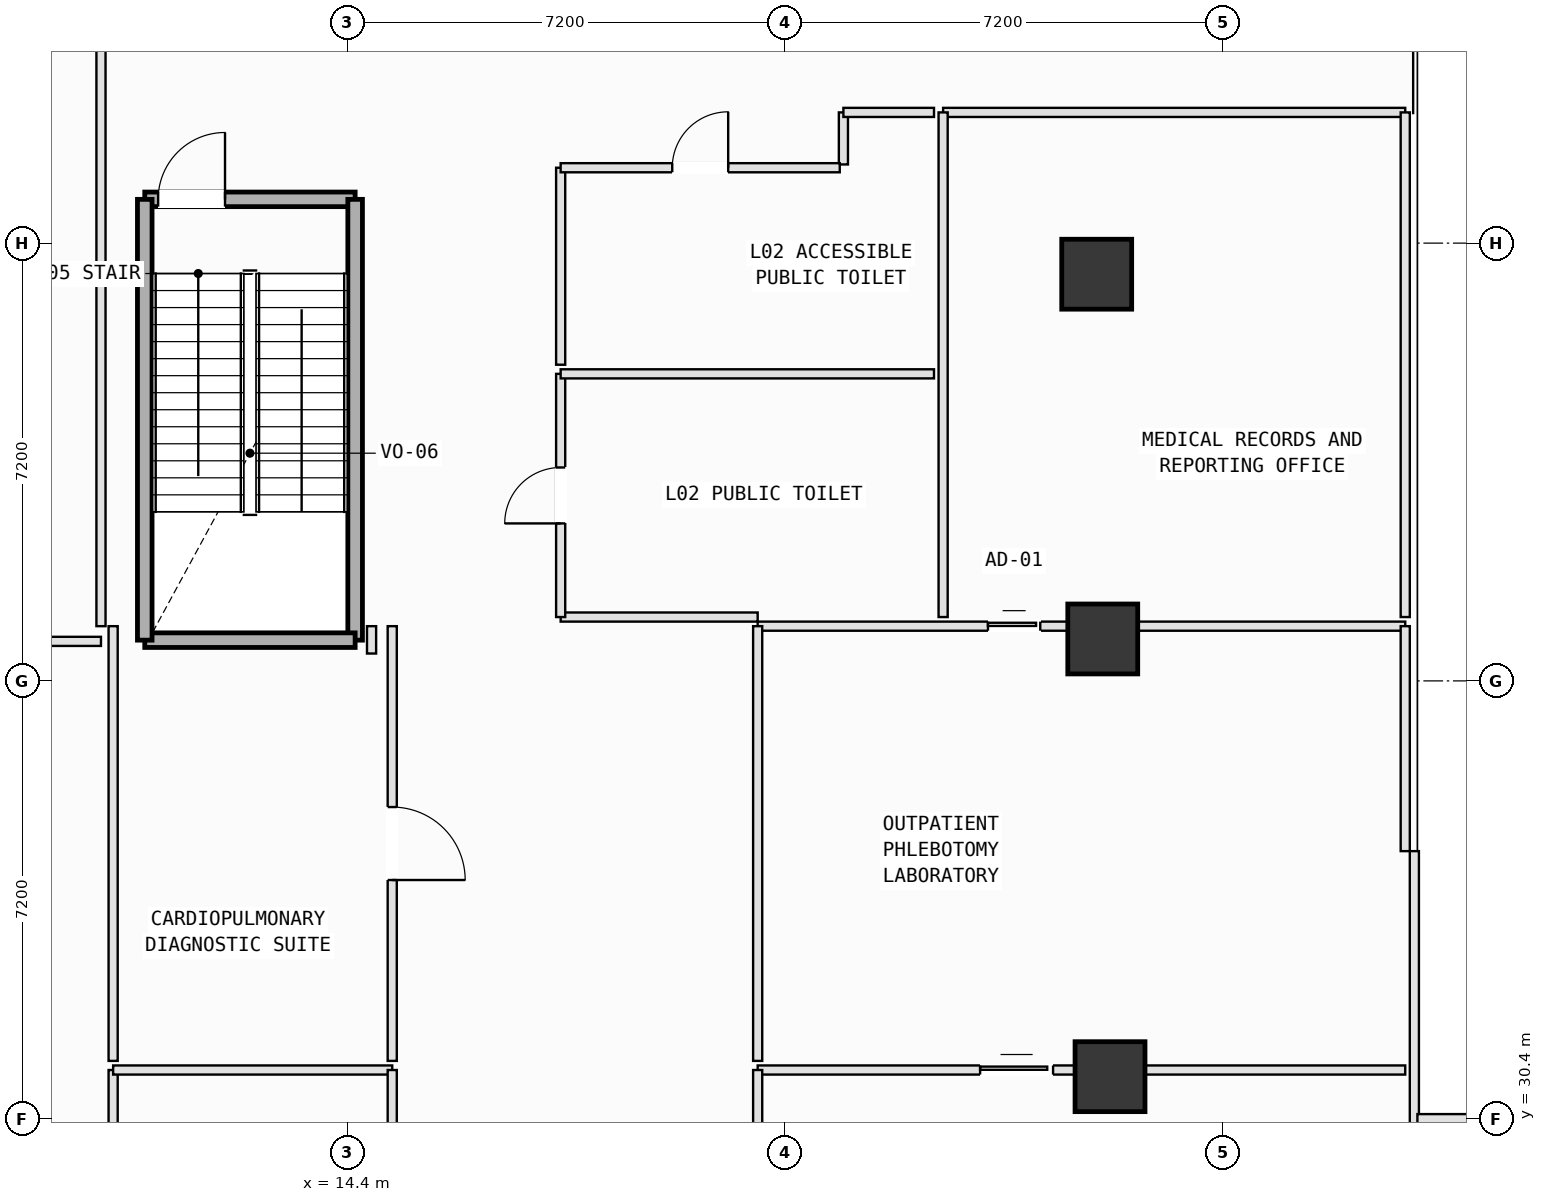
"""IFC4 building model, lengths in metres.
Left out: names, types, materials, properties, quantities, classifications, styles, units other than length and angle.
Written with IfcOpenShell. Run it as: python <this file> out.ifc"""

import sys

from ifc_helpers import new_model, si_unit, direction, frame, frame_2d, origin, origin_2d, place, context, subcontext, project, spatial, rectangle, extrude, element, fill, save


model = new_model("IFC4")
c1 = context("Model", 3, precision=1e-05, world=origin(), true_north=direction((0.0, 1.0)))
c2 = subcontext(c1, "Body", "Model", "MODEL_VIEW")
j1 = project(units=[si_unit("LENGTHUNIT", "METRE"), si_unit("PLANEANGLEUNIT", "RADIAN")], contexts=[c1])
p1 = place(None, origin())
s1 = spatial("IfcSite", under=j1, at=p1, CompositionType="ELEMENT")
p2 = place(p1, origin())
s2 = spatial("IfcBuilding", under=s1, at=p2, CompositionType="ELEMENT")
p3 = place(p2, frame((0.0, 0.0, 10.8)))
s3 = spatial("IfcBuildingStorey", under=s2, at=p3, CompositionType="ELEMENT", Elevation=10.8)
for number, where, z_axis, x_axis in (
    (1, (26.945, 31.091, 0.0), (0.0, 0.0, 1.0), (1.0, 0.0, 0.0)),
    (2, (26.825, 38.29, 0.0), (0.0, 0.0, 1.0), (1.0, 0.0, 0.0)),
    (3, (26.726, 44.289, 0.0), (0.0, 0.0, 1.0), (1.0, 0.0, 0.0)),
):
    element("IfcColumn", number, at=place(p3, frame(where, z_axis=z_axis, x_axis=x_axis)), inside=s3, PredefinedType="COLUMN", context=c2, shape_type="SweptSolid", body=[
        extrude(rectangle(XDim=1.15, YDim=1.15, at=origin_2d()), origin(), (0.0, 0.0, 1.0), 5.4),
    ])
p4 = place(p3, frame((11.07, 45.52, 0.0), z_axis=(0.0, 0.0, 1.0), x_axis=(1.0, 0.0, 0.0)))
e4 = element("IfcWall", 4, at=p4, inside=s3, PredefinedType="SOLIDWALL", context=c2, shape_type="SweptSolid", body=[
    extrude(rectangle(XDim=3.46, YDim=0.24, at=frame_2d((1.73, 0.0))), origin(), (0.0, 0.0, 1.0), 5.15),
])
p5 = place(p4, frame((0.22, 0.0, 0.0)))
e5 = element("IfcOpeningElement", 5, at=p5, cuts=e4, PredefinedType="OPENING", context=c2, shape_type="SweptSolid", body=[
    extrude(rectangle(XDim=1.1, YDim=2.15, at=frame_2d((0.55, 1.075))), frame((0.0, 0.13, 0.0), z_axis=(0.0, -1.0, 0.0), x_axis=(1.0, 0.0, 0.0)), (0.0, 0.0, 1.0), 0.26),
])
p6 = place(p3, frame((14.53, 45.52, 0.0), z_axis=(0.0, 0.0, 1.0), x_axis=(0.0, -1.0, 0.0)))
e6 = element("IfcWall", 6, at=p6, inside=s3, PredefinedType="SOLIDWALL", context=c2, shape_type="SweptSolid", body=[
    extrude(rectangle(XDim=7.25, YDim=0.24, at=frame_2d((3.625, 0.0))), origin(), (0.0, 0.0, 1.0), 5.15),
])
p7 = place(p3, frame((14.53, 38.27, 0.0), z_axis=(0.0, 0.0, 1.0), x_axis=(-1.0, 0.0, 0.0)))
e7 = element("IfcWall", 7, at=p7, inside=s3, PredefinedType="SOLIDWALL", context=c2, shape_type="SweptSolid", body=[
    extrude(rectangle(XDim=3.46, YDim=0.24, at=frame_2d((1.73, 0.0))), origin(), (0.0, 0.0, 1.0), 5.15),
])
p8 = place(p3, frame((11.07, 38.27, 0.0), z_axis=(0.0, 0.0, 1.0), x_axis=(0.0, 1.0, 0.0)))
e8 = element("IfcWall", 8, at=p8, inside=s3, PredefinedType="SOLIDWALL", context=c2, shape_type="SweptSolid", body=[
    extrude(rectangle(XDim=7.25, YDim=0.24, at=frame_2d((3.625, 0.0))), origin(), (0.0, 0.0, 1.0), 5.15),
])
p9 = place(p3, frame((31.95, 20.31, 0.0), z_axis=(0.0, 0.0, 1.0), x_axis=(0.0, 1.0, 0.0)))
e9 = element("IfcWall", 9, at=p9, inside=s3, PredefinedType="PARTITIONING", context=c2, shape_type="SweptSolid", body=[
    extrude(rectangle(XDim=14.49, YDim=0.15, at=frame_2d((7.245, 0.0))), origin(), (0.0, 0.0, 1.0), 5.15),
])
p10 = place(p3, frame((32.0, 30.4, 0.0), z_axis=(0.0, 0.0, 1.0), x_axis=(1.0, 0.0, 0.0)))
e10 = element("IfcWall", 10, at=p10, inside=s3, PredefinedType="PARTITIONING", context=c2, shape_type="SweptSolid", body=[
    extrude(rectangle(XDim=3.85, YDim=0.15, at=frame_2d((1.925, 0.0))), origin(), (0.0, 0.0, 1.0), 4.235),
])
p11 = place(p3, frame((10.55, 20.31, 0.0), z_axis=(0.0, 0.0, 1.0), x_axis=(0.0, 1.0, 0.0)))
e11 = element("IfcWall", 11, at=p11, inside=s3, PredefinedType="PARTITIONING", context=c2, shape_type="SweptSolid", body=[
    extrude(rectangle(XDim=10.89, YDim=0.15, at=frame_2d((5.445, 0.0))), origin(), (0.0, 0.0, 1.0), 5.15),
])
p12 = place(p3, frame((10.55, 31.2, 0.0), z_axis=(0.0, 0.0, 1.0), x_axis=(1.0, 0.0, 0.0)))
e12 = element("IfcWall", 12, at=p12, inside=s3, PredefinedType="PARTITIONING", context=c2, shape_type="SweptSolid", body=[
    extrude(rectangle(XDim=4.59, YDim=0.15, at=frame_2d((2.295, 0.0))), origin(), (0.0, 0.0, 1.0), 5.15),
])
p13 = place(p3, frame((15.14, 31.2, 0.0), z_axis=(0.0, 0.0, 1.0), x_axis=(0.0, -1.0, 0.0)))
e13 = element("IfcWall", 13, at=p13, inside=s3, PredefinedType="PARTITIONING", context=c2, shape_type="SweptSolid", body=[
    extrude(rectangle(XDim=10.89, YDim=0.15, at=frame_2d((5.445, 0.0))), origin(), (0.0, 0.0, 1.0), 5.15),
])
p14 = place(p13, frame((4.845, 0.0, 0.0)))
e14 = element("IfcOpeningElement", 14, at=p14, cuts=e13, PredefinedType="OPENING", context=c2, shape_type="SweptSolid", body=[
    extrude(rectangle(XDim=1.2, YDim=2.15, at=frame_2d((0.6, 1.075))), frame((0.0, 0.085, 0.0), z_axis=(0.0, -1.0, 0.0), x_axis=(1.0, 0.0, 0.0)), (0.0, 0.0, 1.0), 0.17),
])
p15 = place(p3, frame((21.15, 31.2, 0.0), z_axis=(0.0, 0.0, 1.0), x_axis=(1.0, 0.0, 0.0)))
e15 = element("IfcWall", 15, at=p15, inside=s3, PredefinedType="PARTITIONING", context=c2, shape_type="SweptSolid", body=[
    extrude(rectangle(XDim=10.65, YDim=0.15, at=frame_2d((5.325, 0.0))), origin(), (0.0, 0.0, 1.0), 4.235),
])
p16 = place(p15, frame((3.658, 0.0, 0.0)))
e16 = element("IfcOpeningElement", 16, at=p16, cuts=e15, PredefinedType="OPENING", context=c2, shape_type="SweptSolid", body=[
    extrude(rectangle(XDim=1.2, YDim=2.15, at=frame_2d((0.6, 1.075))), frame((0.0, 0.085, 0.0), z_axis=(0.0, -1.0, 0.0), x_axis=(1.0, 0.0, 0.0)), (0.0, 0.0, 1.0), 0.17),
])
p17 = place(p3, frame((21.15, 20.31, 0.0), z_axis=(0.0, 0.0, 1.0), x_axis=(0.0, 1.0, 0.0)))
e17 = element("IfcWall", 17, at=p17, inside=s3, PredefinedType="PARTITIONING", context=c2, shape_type="SweptSolid", body=[
    extrude(rectangle(XDim=10.89, YDim=0.15, at=frame_2d((5.445, 0.0))), origin(), (0.0, 0.0, 1.0), 5.15),
])
p18 = place(p3, frame((10.55, 31.35, 0.0), z_axis=(0.0, 0.0, 1.0), x_axis=(0.0, 1.0, 0.0)))
e18 = element("IfcWall", 18, at=p18, inside=s3, PredefinedType="PARTITIONING", context=c2, shape_type="SweptSolid", body=[
    extrude(rectangle(XDim=7.15, YDim=0.15, at=frame_2d((3.575, 0.0))), origin(), (0.0, 0.0, 1.0), 5.15),
])
p19 = place(p3, frame((14.8, 38.05, 0.0), z_axis=(0.0, 0.0, 1.0), x_axis=(0.0, 1.0, 0.0)))
e19 = element("IfcWall", 19, at=p19, inside=s3, PredefinedType="PARTITIONING", context=c2, shape_type="SweptSolid", body=[
    extrude(rectangle(XDim=0.45, YDim=0.15, at=frame_2d((0.225, 0.0))), origin(), (0.0, 0.0, 1.0), 5.15),
])
p20 = place(p3, frame((15.14, 38.5, 0.0), z_axis=(0.0, 0.0, 1.0), x_axis=(0.0, -1.0, 0.0)))
e20 = element("IfcWall", 20, at=p20, inside=s3, PredefinedType="PARTITIONING", context=c2, shape_type="SweptSolid", body=[
    extrude(rectangle(XDim=7.15, YDim=0.15, at=frame_2d((3.575, 0.0))), origin(), (0.0, 0.0, 1.0), 5.15),
])
p21 = place(p20, frame((2.975, 0.0, 0.0)))
e21 = element("IfcOpeningElement", 21, at=p21, cuts=e20, PredefinedType="OPENING", context=c2, shape_type="SweptSolid", body=[
    extrude(rectangle(XDim=1.2, YDim=2.15, at=frame_2d((0.6, 1.075))), frame((0.0, 0.085, 0.0), z_axis=(0.0, -1.0, 0.0), x_axis=(1.0, 0.0, 0.0)), (0.0, 0.0, 1.0), 0.17),
])
p22 = place(p3, frame((21.15, 38.5, 0.0), z_axis=(0.0, 0.0, 1.0), x_axis=(1.0, 0.0, 0.0)))
e22 = element("IfcWall", 22, at=p22, inside=s3, PredefinedType="PARTITIONING", context=c2, shape_type="SweptSolid", body=[
    extrude(rectangle(XDim=10.65, YDim=0.15, at=frame_2d((5.325, 0.0))), origin(), (0.0, 0.0, 1.0), 5.15),
])
p23 = place(p22, frame((3.787, 0.0, 0.0)))
e23 = element("IfcOpeningElement", 23, at=p23, cuts=e22, PredefinedType="OPENING", context=c2, shape_type="SweptSolid", body=[
    extrude(rectangle(XDim=0.86, YDim=2.06, at=frame_2d((0.43, 1.03))), frame((0.0, 0.085, 0.0), z_axis=(0.0, -1.0, 0.0), x_axis=(1.0, 0.0, 0.0)), (0.0, 0.0, 1.0), 0.17),
])
p24 = place(p3, frame((31.8, 38.5, 0.0), z_axis=(0.0, 0.0, 1.0), x_axis=(0.0, -1.0, 0.0)))
e24 = element("IfcWall", 24, at=p24, inside=s3, PredefinedType="PARTITIONING", context=c2, shape_type="SweptSolid", body=[
    extrude(rectangle(XDim=3.7, YDim=0.15, at=frame_2d((1.85, 0.0))), origin(), (0.0, 0.0, 1.0), 5.15),
])
p25 = place(p3, frame((21.15, 31.35, 0.0), z_axis=(0.0, 0.0, 1.0), x_axis=(0.0, 1.0, 0.0)))
e25 = element("IfcWall", 25, at=p25, inside=s3, PredefinedType="PARTITIONING", context=c2, shape_type="SweptSolid", body=[
    extrude(rectangle(XDim=7.15, YDim=0.15, at=frame_2d((3.575, 0.0))), origin(), (0.0, 0.0, 1.0), 5.15),
])
p26 = place(p3, frame((24.2, 46.95, 0.0), z_axis=(0.0, 0.0, 1.0), x_axis=(1.0, 0.0, 0.0)))
e26 = element("IfcWall", 26, at=p26, inside=s3, PredefinedType="PARTITIONING", context=c2, shape_type="SweptSolid", body=[
    extrude(rectangle(XDim=7.6, YDim=0.15, at=frame_2d((3.8, 0.0))), origin(), (0.0, 0.0, 1.0), 5.15),
])
for number, where, z_axis, x_axis in (
    (27, (31.8, 46.95, 0.0), (0.0, 0.0, 1.0), (0.0, -1.0, 0.0)),
    (28, (24.2, 38.65, 0.0), (0.0, 0.0, 1.0), (0.0, 1.0, 0.0)),
):
    element("IfcWall", number, at=place(p3, frame(where, z_axis=z_axis, x_axis=x_axis)), inside=s3, PredefinedType="PARTITIONING", context=c2, shape_type="SweptSolid", body=[
        extrude(rectangle(XDim=8.3, YDim=0.15, at=frame_2d((4.15, 0.0))), origin(), (0.0, 0.0, 1.0), 5.15),
    ])
p27 = place(p3, frame((21.15, 38.65, 0.0), z_axis=(0.0, 0.0, 1.0), x_axis=(-1.0, 0.0, 0.0)))
e29 = element("IfcWall", 29, at=p27, inside=s3, PredefinedType="PARTITIONING", context=c2, shape_type="SweptSolid", body=[
    extrude(rectangle(XDim=3.24, YDim=0.15, at=frame_2d((1.62, 0.0))), origin(), (0.0, 0.0, 1.0), 5.15),
])
p28 = place(p3, frame((17.91, 38.65, 0.0), z_axis=(0.0, 0.0, 1.0), x_axis=(0.0, 1.0, 0.0)))
e30 = element("IfcWall", 30, at=p28, inside=s3, PredefinedType="PARTITIONING", context=c2, shape_type="SweptSolid", body=[
    extrude(rectangle(XDim=4.0, YDim=0.15, at=frame_2d((2.0, 0.0))), origin(), (0.0, 0.0, 1.0), 5.15),
])
p29 = place(p28, frame((1.54, 0.0, 0.0)))
e31 = element("IfcOpeningElement", 31, at=p29, cuts=e30, PredefinedType="OPENING", context=c2, shape_type="SweptSolid", body=[
    extrude(rectangle(XDim=0.92, YDim=2.1, at=frame_2d((0.46, 1.05))), frame((0.0, 0.085, 0.0), z_axis=(0.0, -1.0, 0.0), x_axis=(1.0, 0.0, 0.0)), (0.0, 0.0, 1.0), 0.17),
])
p30 = place(p3, frame((17.91, 42.65, 0.0), z_axis=(0.0, 0.0, 1.0), x_axis=(1.0, 0.0, 0.0)))
e32 = element("IfcWall", 32, at=p30, inside=s3, PredefinedType="PARTITIONING", context=c2, shape_type="SweptSolid", body=[
    extrude(rectangle(XDim=6.14, YDim=0.15, at=frame_2d((3.07, 0.0))), origin(), (0.0, 0.0, 1.0), 5.15),
])
p31 = place(p3, frame((22.56, 46.094, 0.0), z_axis=(0.0, 0.0, 1.0), x_axis=(0.0, 1.0, 0.0)))
e33 = element("IfcWall", 33, at=p31, inside=s3, PredefinedType="PARTITIONING", context=c2, shape_type="SweptSolid", body=[
    extrude(rectangle(XDim=0.856, YDim=0.15, at=frame_2d((0.428, 0.0))), origin(), (0.0, 0.0, 1.0), 5.15),
])
p32 = place(p3, frame((22.56, 46.95, 0.0), z_axis=(0.0, 0.0, 1.0), x_axis=(1.0, 0.0, 0.0)))
e34 = element("IfcWall", 34, at=p32, inside=s3, PredefinedType="PARTITIONING", context=c2, shape_type="SweptSolid", body=[
    extrude(rectangle(XDim=1.49, YDim=0.15, at=frame_2d((0.745, 0.0))), origin(), (0.0, 0.0, 1.0), 5.15),
])
p33 = place(p3, frame((17.91, 42.8, 0.0), z_axis=(0.0, 0.0, 1.0), x_axis=(0.0, 1.0, 0.0)))
e35 = element("IfcWall", 35, at=p33, inside=s3, PredefinedType="PARTITIONING", context=c2, shape_type="SweptSolid", body=[
    extrude(rectangle(XDim=3.24, YDim=0.15, at=frame_2d((1.62, 0.0))), origin(), (0.0, 0.0, 1.0), 5.15),
])
p34 = place(p3, frame((17.91, 46.04, 0.0), z_axis=(0.0, 0.0, 1.0), x_axis=(1.0, 0.0, 0.0)))
e36 = element("IfcWall", 36, at=p34, inside=s3, PredefinedType="PARTITIONING", context=c2, shape_type="SweptSolid", body=[
    extrude(rectangle(XDim=4.59, YDim=0.15, at=frame_2d((2.295, 0.0))), origin(), (0.0, 0.0, 1.0), 5.15),
])
p35 = place(p34, frame((1.835, 0.0, 0.0)))
e37 = element("IfcOpeningElement", 37, at=p35, cuts=e36, PredefinedType="OPENING", context=c2, shape_type="SweptSolid", body=[
    extrude(rectangle(XDim=0.92, YDim=2.1, at=frame_2d((0.46, 1.05))), frame((0.0, 0.085, 0.0), z_axis=(0.0, -1.0, 0.0), x_axis=(1.0, 0.0, 0.0)), (0.0, 0.0, 1.0), 0.17),
])
p36 = place(p3, frame((10.35, 38.25, 0.0), z_axis=(0.0, 0.0, 1.0), x_axis=(-1.0, 0.0, 0.0)))
e38 = element("IfcWall", 38, at=p36, inside=s3, PredefinedType="PARTITIONING", context=c2, shape_type="SweptSolid", body=[
    extrude(rectangle(XDim=3.73, YDim=0.15, at=frame_2d((1.865, 0.0))), origin(), (0.0, 0.0, 1.0), 5.15),
])
p37 = place(p36, frame((1.405, 0.0, 0.0)))
e39 = element("IfcOpeningElement", 39, at=p37, cuts=e38, PredefinedType="OPENING", context=c2, shape_type="SweptSolid", body=[
    extrude(rectangle(XDim=0.92, YDim=2.1, at=frame_2d((0.46, 1.05))), frame((0.0, 0.085, 0.0), z_axis=(0.0, -1.0, 0.0), x_axis=(1.0, 0.0, 0.0)), (0.0, 0.0, 1.0), 0.17),
])
p38 = place(p3, frame((10.35, 49.5, 0.0), z_axis=(0.0, 0.0, 1.0), x_axis=(0.0, -1.0, 0.0)))
e40 = element("IfcWall", 40, at=p38, inside=s3, PredefinedType="PARTITIONING", context=c2, shape_type="SweptSolid", body=[
    extrude(rectangle(XDim=11.0, YDim=0.15, at=frame_2d((5.5, 0.0))), origin(), (0.0, 0.0, 1.0), 5.15),
])
p39 = place(p5, origin())
e41 = element("IfcDoor", 41, at=p39, inside=s3, OperationType="SINGLE_SWING_RIGHT", PredefinedType="DOOR", context=c2, shape_type="SweptSolid", body=[
    extrude(rectangle(XDim=1.1, YDim=2.15, at=frame_2d((0.55, 1.075))), frame((0.0, 0.025, 0.0), z_axis=(0.0, -1.0, 0.0), x_axis=(1.0, 0.0, 0.0)), (0.0, 0.0, 1.0), 0.05),
])
fill(e5, e41)
p40 = place(p21, origin())
e42 = element("IfcDoor", 42, at=p40, inside=s3, OperationType="SINGLE_SWING_RIGHT", PredefinedType="DOOR", context=c2, shape_type="SweptSolid", body=[
    extrude(rectangle(XDim=1.2, YDim=2.15, at=frame_2d((0.6, 1.075))), frame((0.0, 0.025, 0.0), z_axis=(0.0, -1.0, 0.0), x_axis=(1.0, 0.0, 0.0)), (0.0, 0.0, 1.0), 0.05),
])
fill(e21, e42)
p41 = place(p29, origin())
e43 = element("IfcDoor", 43, at=p41, inside=s3, OperationType="SINGLE_SWING_LEFT", PredefinedType="DOOR", context=c2, shape_type="SweptSolid", body=[
    extrude(rectangle(XDim=0.92, YDim=2.1, at=frame_2d((0.46, 1.05))), frame((0.0, 0.025, 0.0), z_axis=(0.0, -1.0, 0.0), x_axis=(1.0, 0.0, 0.0)), (0.0, 0.0, 1.0), 0.05),
])
fill(e31, e43)
p42 = place(p35, origin())
e44 = element("IfcDoor", 44, at=p42, inside=s3, OperationType="SINGLE_SWING_RIGHT", PredefinedType="DOOR", context=c2, shape_type="SweptSolid", body=[
    extrude(rectangle(XDim=0.92, YDim=2.1, at=frame_2d((0.46, 1.05))), frame((0.0, 0.025, 0.0), z_axis=(0.0, -1.0, 0.0), x_axis=(1.0, 0.0, 0.0)), (0.0, 0.0, 1.0), 0.05),
])
fill(e37, e44)
p43 = place(p16, origin())
e45 = element("IfcDoor", 45, at=p43, inside=s3, OperationType="SLIDING_TO_LEFT", PredefinedType="DOOR", context=c2, shape_type="SweptSolid", body=[
    extrude(rectangle(XDim=1.2, YDim=2.15, at=frame_2d((0.6, 1.075))), frame((0.0, 0.025, 0.0), z_axis=(0.0, -1.0, 0.0), x_axis=(1.0, 0.0, 0.0)), (0.0, 0.0, 1.0), 0.05),
])
fill(e16, e45)
p44 = place(p23, origin())
e46 = element("IfcDoor", 46, at=p44, inside=s3, OperationType="SLIDING_TO_LEFT", PredefinedType="DOOR", context=c2, shape_type="SweptSolid", body=[
    extrude(rectangle(XDim=0.86, YDim=2.06, at=frame_2d((0.43, 1.03))), frame((0.0, 0.025, 0.0), z_axis=(0.0, -1.0, 0.0), x_axis=(1.0, 0.0, 0.0)), (0.0, 0.0, 1.0), 0.05),
])
fill(e23, e46)
save(model, sys.argv[1])
